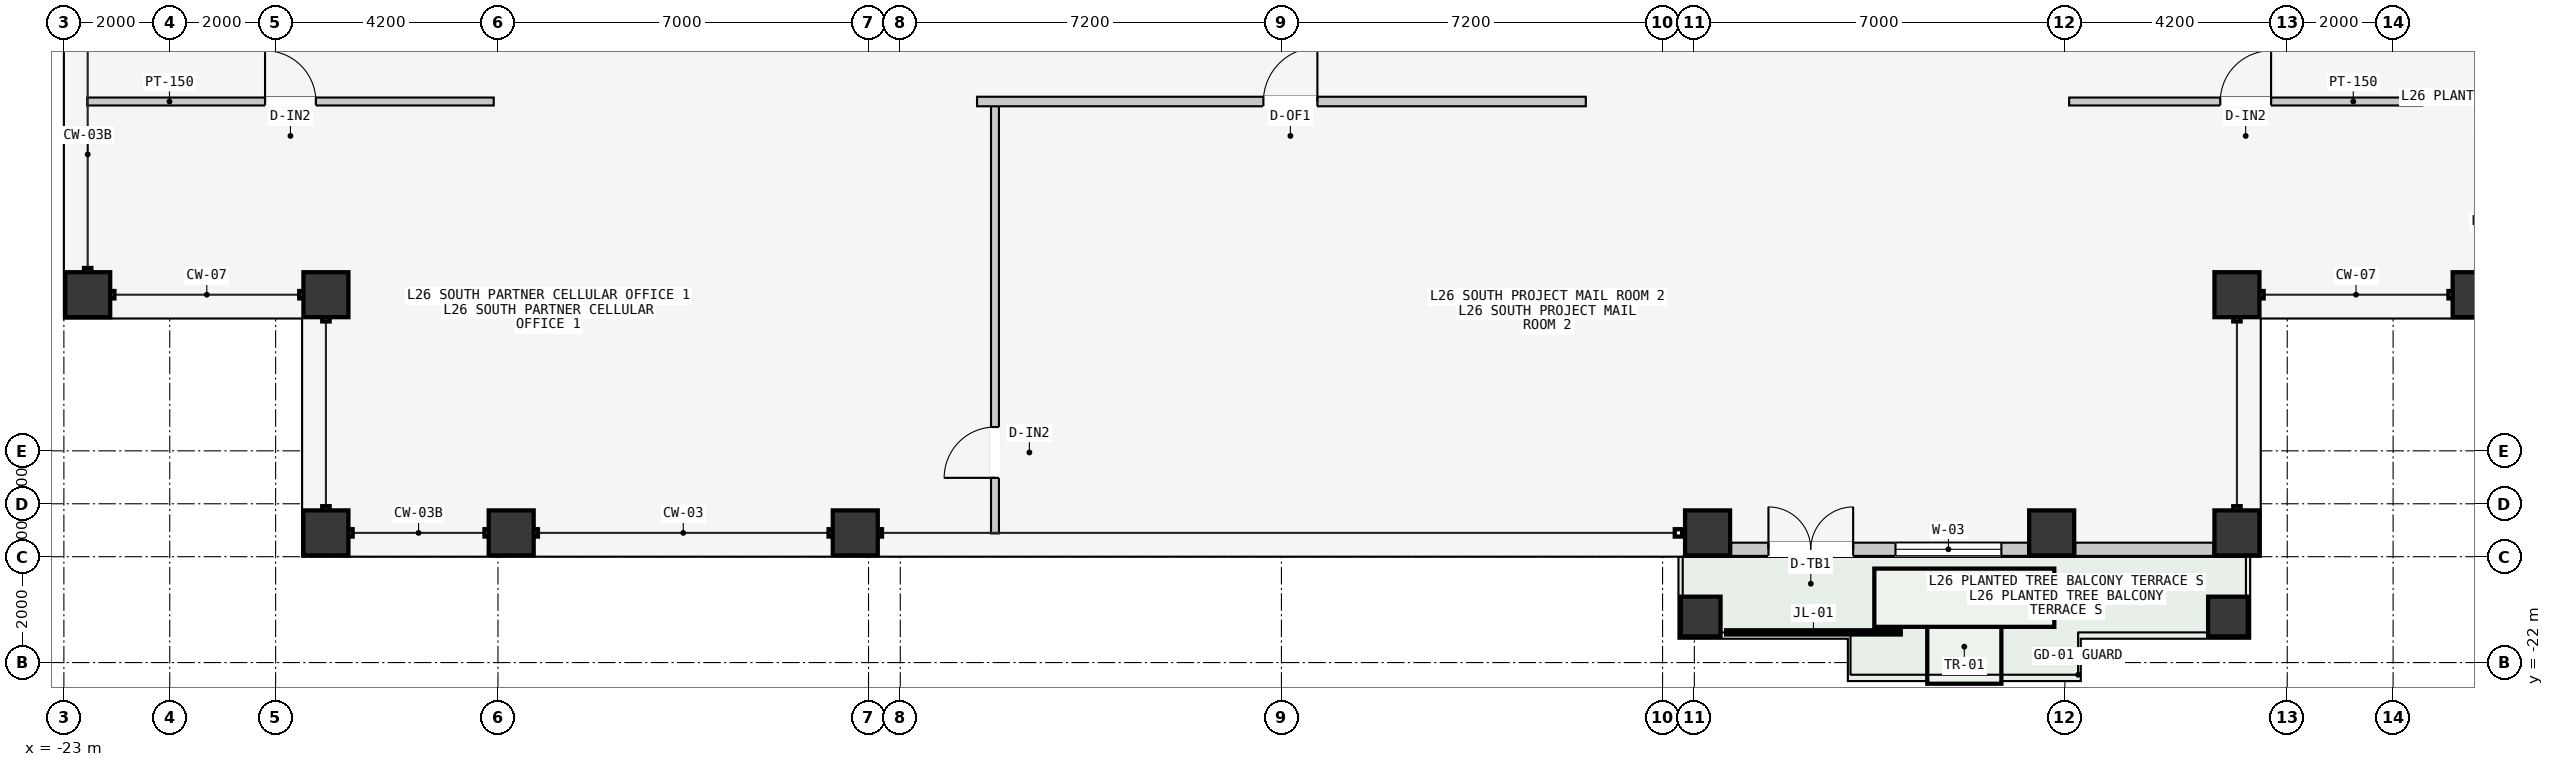
"""IFC4 building model, lengths in metres.
Left out: names, types, materials, properties, quantities, classifications, styles, units other than length and angle.
Written with IfcOpenShell. Run it as: python <this file> out.ifc"""

import sys

from ifc_helpers import new_model, si_unit, direction, frame, frame_2d, origin, origin_2d, place, context, subcontext, project, spatial, rectangle, hollow_rectangle, extrude, element, fill, save


model = new_model("IFC4")
c1 = context("Model", 3, precision=1e-05, world=origin(), true_north=direction((0.0, 1.0)))
c2 = subcontext(c1, "Body", "Model", "MODEL_VIEW")
j1 = project(units=[si_unit("LENGTHUNIT", "METRE"), si_unit("PLANEANGLEUNIT", "RADIAN")], contexts=[c1])
p1 = place(None, origin())
s1 = spatial("IfcSite", under=j1, at=p1, CompositionType="ELEMENT")
p2 = place(p1, origin())
s2 = spatial("IfcBuilding", under=s1, at=p2, CompositionType="ELEMENT")
p3 = place(p2, frame((0.0, 0.0, 102.6)))
s3 = spatial("IfcBuildingStorey", under=s2, at=p3, CompositionType="ELEMENT", Elevation=102.6)
for number, where, z_axis, x_axis in (
    (1, (-18.05, -19.55, 0.0), (0.0, 0.0, 1.0), (1.0, 0.0, 0.0)),
    (2, (-14.55, -19.55, 0.0), (0.0, 0.0, 1.0), (1.0, 0.0, 0.0)),
    (3, (-8.05, -19.55, 0.0), (0.0, 0.0, 1.0), (1.0, 0.0, 0.0)),
    (4, (8.05, -19.55, 0.0), (0.0, 0.0, 1.0), (1.0, 0.0, 0.0)),
    (5, (14.55, -19.55, 0.0), (0.0, 0.0, 1.0), (1.0, 0.0, 0.0)),
    (6, (18.05, -19.55, 0.0), (0.0, 0.0, 1.0), (1.0, 0.0, 0.0)),
    (7, (-22.55, -15.05, 0.0), (0.0, 0.0, 1.0), (0.0, 1.0, 0.0)),
    (8, (22.55, -15.05, 0.0), (0.0, 0.0, 1.0), (0.0, 1.0, 0.0)),
    (9, (18.05, -15.05, 0.0), (0.0, 0.0, 1.0), (1.0, 0.0, 0.0)),
    (10, (-18.05, -15.05, 0.0), (0.0, 0.0, 1.0), (1.0, 0.0, 0.0)),
):
    element("IfcColumn", number, at=place(p3, frame(where, z_axis=z_axis, x_axis=x_axis)), inside=s3, PredefinedType="COLUMN", context=c2, shape_type="SweptSolid", body=[
        extrude(hollow_rectangle(XDim=0.85, YDim=0.85, WallThickness=0.04, at=origin_2d()), origin(), (0.0, 0.0, 1.0), 3.6),
    ])
for number, where, z_axis, x_axis in (
    (11, (7.92, -21.13, 0.0), (0.0, 0.0, 1.0), (1.0, 0.0, 0.0)),
    (12, (17.88, -21.13, 0.0), (0.0, 0.0, 1.0), (1.0, 0.0, 0.0)),
):
    element("IfcColumn", number, at=place(p3, frame(where, z_axis=z_axis, x_axis=x_axis)), inside=s3, PredefinedType="COLUMN", context=c2, shape_type="SweptSolid", body=[
        extrude(hollow_rectangle(XDim=0.75, YDim=0.75, WallThickness=0.032, at=origin_2d()), origin(), (0.0, 0.0, 1.0), 3.6),
    ])
p4 = place(p3, frame((8.495, -19.86, 0.0), z_axis=(0.0, 0.0, 1.0), x_axis=(1.0, 0.0, 0.0)))
e13 = element("IfcWall", 13, at=p4, inside=s3, PredefinedType="STANDARD", context=c2, shape_type="SweptSolid", body=[
    extrude(rectangle(XDim=5.61, YDim=0.25, at=frame_2d((2.805, 0.0))), origin(), (0.0, 0.0, 1.0), 3.4),
])
p5 = place(p4, frame((0.705, 0.0, 0.0)))
e14 = element("IfcOpeningElement", 14, at=p5, cuts=e13, PredefinedType="OPENING", context=c2, shape_type="SweptSolid", body=[
    extrude(rectangle(XDim=1.6, YDim=2.2, at=frame_2d((0.8, 1.1))), frame((0.0, 0.135, 0.0), z_axis=(0.0, -1.0, 0.0), x_axis=(1.0, 0.0, 0.0)), (0.0, 0.0, 1.0), 0.27),
])
p6 = place(p4, frame((3.105, 0.0, 0.85)))
e15 = element("IfcOpeningElement", 15, at=p6, cuts=e13, PredefinedType="OPENING", context=c2, shape_type="SweptSolid", body=[
    extrude(rectangle(XDim=2.0, YDim=2.1, at=frame_2d((1.0, 1.05))), frame((0.0, 0.135, 0.0), z_axis=(0.0, -1.0, 0.0), x_axis=(1.0, 0.0, 0.0)), (0.0, 0.0, 1.0), 0.27),
])
p7 = place(p3, frame((14.995, -19.86, 0.0), z_axis=(0.0, 0.0, 1.0), x_axis=(1.0, 0.0, 0.0)))
e16 = element("IfcWall", 16, at=p7, inside=s3, PredefinedType="STANDARD", context=c2, shape_type="SweptSolid", body=[
    extrude(rectangle(XDim=2.61, YDim=0.25, at=frame_2d((1.305, 0.0))), origin(), (0.0, 0.0, 1.0), 3.4),
])
p8 = place(p3, frame((-5.411, -19.56, 0.0), z_axis=(0.0, 0.0, 1.0), x_axis=(0.0, 1.0, 0.0)))
e17 = element("IfcWall", 17, at=p8, inside=s3, PredefinedType="PARTITIONING", context=c2, shape_type="SweptSolid", body=[
    extrude(rectangle(XDim=8.1, YDim=0.15, at=frame_2d((4.05, 0.0))), origin(), (0.0, 0.0, 1.0), 3.4),
])
p9 = place(p8, frame((1.05, 0.0, 0.0)))
e18 = element("IfcOpeningElement", 18, at=p9, cuts=e17, PredefinedType="OPENING", context=c2, shape_type="SweptSolid", body=[
    extrude(rectangle(XDim=0.96, YDim=2.18, at=frame_2d((0.48, 1.09))), frame((0.0, 0.085, 0.0), z_axis=(0.0, -1.0, 0.0), x_axis=(1.0, 0.0, 0.0)), (0.0, 0.0, 1.0), 0.17),
])
p10 = place(p3, frame((-5.75, -11.4, 0.0), z_axis=(0.0, 0.0, 1.0), x_axis=(1.0, 0.0, 0.0)))
e19 = element("IfcWall", 19, at=p10, inside=s3, PredefinedType="PARTITIONING", context=c2, shape_type="SweptSolid", body=[
    extrude(rectangle(XDim=11.5, YDim=0.18, at=frame_2d((5.75, 0.0))), origin(), (0.0, 0.0, 1.0), 3.4),
])
p11 = place(p10, frame((5.409, 0.0, 0.0)))
e20 = element("IfcOpeningElement", 20, at=p11, cuts=e19, PredefinedType="OPENING", context=c2, shape_type="SweptSolid", body=[
    extrude(rectangle(XDim=1.02, YDim=2.2, at=frame_2d((0.51, 1.1))), frame((0.0, 0.1, 0.0), z_axis=(0.0, -1.0, 0.0), x_axis=(1.0, 0.0, 0.0)), (0.0, 0.0, 1.0), 0.2),
])
p12 = place(p3, frame((-22.56, -11.4, 0.0), z_axis=(0.0, 0.0, 1.0), x_axis=(1.0, 0.0, 0.0)))
e21 = element("IfcWall", 21, at=p12, inside=s3, PredefinedType="PARTITIONING", context=c2, shape_type="SweptSolid", body=[
    extrude(rectangle(XDim=7.68, YDim=0.15, at=frame_2d((3.84, 0.0))), origin(), (0.0, 0.0, 1.0), 3.4),
])
p13 = place(p12, frame((3.36, 0.0, 0.0)))
e22 = element("IfcOpeningElement", 22, at=p13, cuts=e21, PredefinedType="OPENING", context=c2, shape_type="SweptSolid", body=[
    extrude(rectangle(XDim=0.96, YDim=2.18, at=frame_2d((0.48, 1.09))), frame((0.0, 0.085, 0.0), z_axis=(0.0, -1.0, 0.0), x_axis=(1.0, 0.0, 0.0)), (0.0, 0.0, 1.0), 0.17),
])
p14 = place(p3, frame((14.88, -11.4, 0.0), z_axis=(0.0, 0.0, 1.0), x_axis=(1.0, 0.0, 0.0)))
e23 = element("IfcWall", 23, at=p14, inside=s3, PredefinedType="PARTITIONING", context=c2, shape_type="SweptSolid", body=[
    extrude(rectangle(XDim=6.67, YDim=0.15, at=frame_2d((3.335, 0.0))), origin(), (0.0, 0.0, 1.0), 3.4),
])
p15 = place(p14, frame((2.855, 0.0, 0.0)))
e24 = element("IfcOpeningElement", 24, at=p15, cuts=e23, PredefinedType="OPENING", context=c2, shape_type="SweptSolid", body=[
    extrude(rectangle(XDim=0.96, YDim=2.18, at=frame_2d((0.48, 1.09))), frame((0.0, 0.085, 0.0), z_axis=(0.0, -1.0, 0.0), x_axis=(1.0, 0.0, 0.0)), (0.0, 0.0, 1.0), 0.17),
])
p16 = place(p5, origin())
e25 = element("IfcDoor", 25, at=p16, inside=s3, OperationType="DOUBLE_DOOR_SINGLE_SWING", PredefinedType="DOOR", context=c2, shape_type="SweptSolid", body=[
    extrude(rectangle(XDim=1.6, YDim=2.2, at=frame_2d((0.8, 1.1))), frame((0.0, 0.025, 0.0), z_axis=(0.0, -1.0, 0.0), x_axis=(1.0, 0.0, 0.0)), (0.0, 0.0, 1.0), 0.05),
])
fill(e14, e25)
p17 = place(p6, origin())
e26 = element("IfcWindow", 26, at=p17, inside=s3, PartitioningType="SINGLE_PANEL", PredefinedType="WINDOW", context=c2, shape_type="SweptSolid", body=[
    extrude(rectangle(XDim=2.0, YDim=2.1, at=frame_2d((1.0, 1.05))), frame((0.0, 0.03, 0.0), z_axis=(0.0, -1.0, 0.0), x_axis=(1.0, 0.0, 0.0)), (0.0, 0.0, 1.0), 0.06),
])
fill(e15, e26)
p18 = place(p9, origin())
e27 = element("IfcDoor", 27, at=p18, inside=s3, OperationType="SINGLE_SWING_LEFT", PredefinedType="DOOR", context=c2, shape_type="SweptSolid", body=[
    extrude(rectangle(XDim=0.96, YDim=2.18, at=frame_2d((0.48, 1.09))), frame((0.0, 0.025, 0.0), z_axis=(0.0, -1.0, 0.0), x_axis=(1.0, 0.0, 0.0)), (0.0, 0.0, 1.0), 0.05),
])
fill(e18, e27)
p19 = place(p11, origin())
e28 = element("IfcDoor", 28, at=p19, inside=s3, OperationType="SINGLE_SWING_RIGHT", PredefinedType="DOOR", context=c2, shape_type="SweptSolid", body=[
    extrude(rectangle(XDim=1.02, YDim=2.2, at=frame_2d((0.51, 1.1))), frame((0.0, 0.025, 0.0), z_axis=(0.0, -1.0, 0.0), x_axis=(1.0, 0.0, 0.0)), (0.0, 0.0, 1.0), 0.05),
])
fill(e20, e28)
p20 = place(p13, origin())
e29 = element("IfcDoor", 29, at=p20, inside=s3, OperationType="SINGLE_SWING_LEFT", PredefinedType="DOOR", context=c2, shape_type="SweptSolid", body=[
    extrude(rectangle(XDim=0.96, YDim=2.18, at=frame_2d((0.48, 1.09))), frame((0.0, 0.025, 0.0), z_axis=(0.0, -1.0, 0.0), x_axis=(1.0, 0.0, 0.0)), (0.0, 0.0, 1.0), 0.05),
])
fill(e22, e29)
p21 = place(p15, origin())
e30 = element("IfcDoor", 30, at=p21, inside=s3, OperationType="SINGLE_SWING_RIGHT", PredefinedType="DOOR", context=c2, shape_type="SweptSolid", body=[
    extrude(rectangle(XDim=0.96, YDim=2.18, at=frame_2d((0.48, 1.09))), frame((0.0, 0.025, 0.0), z_axis=(0.0, -1.0, 0.0), x_axis=(1.0, 0.0, 0.0)), (0.0, 0.0, 1.0), 0.05),
])
fill(e24, e30)
save(model, sys.argv[1])
